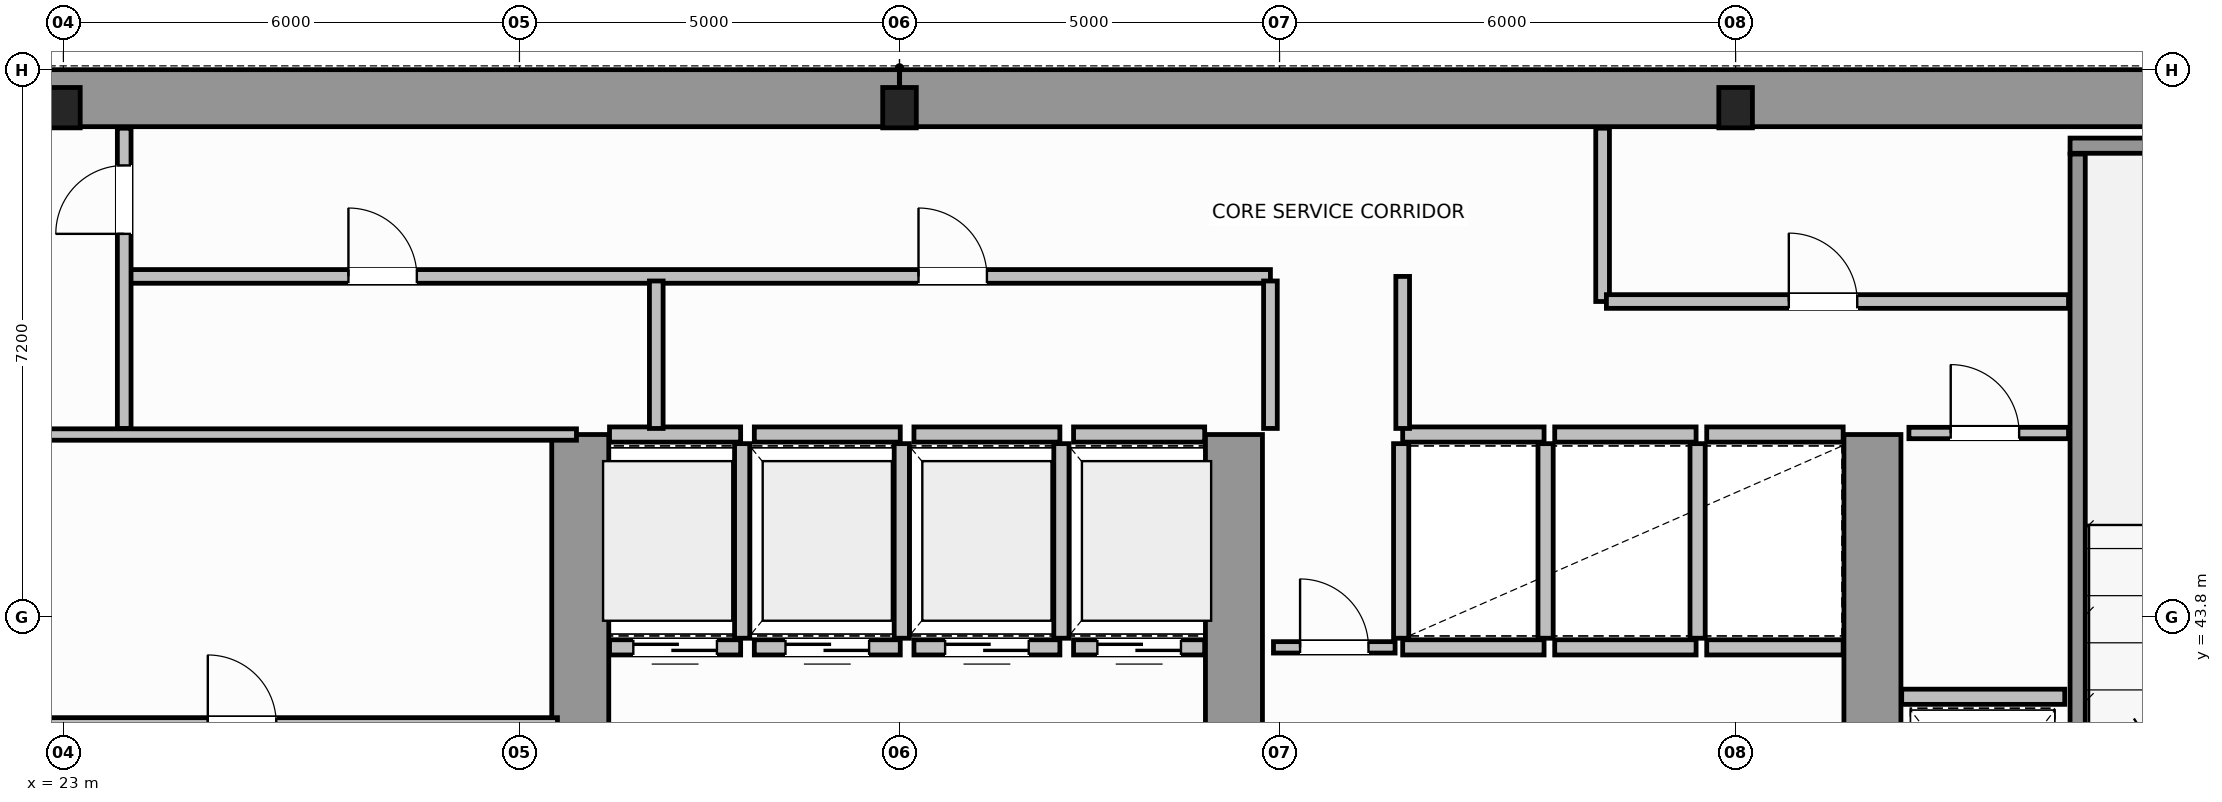
"""IFC4 building model, lengths in metres.
Left out: names, types, materials, properties, quantities, classifications, styles, units other than length and angle.
Written with IfcOpenShell. Run it as: python <this file> out.ifc"""

import sys

from ifc_helpers import new_model, si_unit, direction, frame, frame_2d, origin, origin_2d, place, context, subcontext, project, spatial, rectangle, i_section, extrude, source, transform, mapped, element, fill, save


model = new_model("IFC4")
c1 = context("Model", 3, precision=1e-05, world=origin(), true_north=direction((0.0, 1.0)))
c2 = subcontext(c1, "Body", "Model", "MODEL_VIEW")
j1 = project(units=[si_unit("LENGTHUNIT", "METRE"), si_unit("PLANEANGLEUNIT", "RADIAN")], contexts=[c1])
p1 = place(None, origin())
s1 = spatial("IfcSite", under=j1, at=p1, CompositionType="ELEMENT")
p2 = place(p1, origin())
s2 = spatial("IfcBuilding", under=s1, at=p2, CompositionType="ELEMENT")
p3 = place(p2, frame((0.0, 0.0, 107.2)))
s3 = spatial("IfcBuildingStorey", under=s2, at=p3, CompositionType="ELEMENT", Elevation=107.2)
m1 = source(origin(), c2, "Body", "SweptSolid", [
    extrude(i_section(OverallWidth=0.442, OverallDepth=0.531, WebThickness=0.065, FlangeThickness=0.076, FilletRadius=0.015, at=origin_2d()), origin(), (0.0, 0.0, 1.0), 3.8),
])
for number, where, z_axis, x_axis in (
    (1, (23.0, 50.5, 0.0), (0.0, 0.0, 1.0), (1.0, 0.0, 0.0)),
    (2, (34.0, 50.5, 0.0), (0.0, 0.0, 1.0), (1.0, 0.0, 0.0)),
    (3, (45.0, 50.5, 0.0), (0.0, 0.0, 1.0), (1.0, 0.0, 0.0)),
):
    element("IfcColumn", number, at=place(p3, frame(where, z_axis=z_axis, x_axis=x_axis)), inside=s3, PredefinedType="COLUMN", context=c2, shape_type="MappedRepresentation", body=[
        mapped(m1, transform((0.0, 0.0, 0.0), scale=1.0)),
    ])
for number, where, z_axis, x_axis in (
    (4, (14.379, 50.625, 0.0), (0.0, 0.0, 1.0), (1.0, 0.0, 0.0)),
    (5, (34.002, 50.625, 0.0), (0.0, 0.0, 1.0), (1.0, 0.0, 0.0)),
):
    element("IfcWall", number, at=place(p3, frame(where, z_axis=z_axis, x_axis=x_axis)), inside=s3, PredefinedType="SHEAR", context=c2, shape_type="SweptSolid", body=[
        extrude(rectangle(XDim=19.619, YDim=0.75, at=frame_2d((9.81, 0.0))), origin(), (0.0, 0.0, 1.0), 3.8),
    ])
for number, where, z_axis, x_axis in (
    (6, (29.8, 36.895, 0.0), (0.0, 0.0, 1.0), (0.0, 1.0, 0.0)),
    (7, (38.4, 36.895, 0.0), (0.0, 0.0, 1.0), (0.0, 1.0, 0.0)),
    (8, (46.8, 36.895, 0.0), (0.0, 0.0, 1.0), (0.0, 1.0, 0.0)),
):
    element("IfcWall", number, at=place(p3, frame(where, z_axis=z_axis, x_axis=x_axis)), inside=s3, PredefinedType="SHEAR", context=c2, shape_type="SweptSolid", body=[
        extrude(rectangle(XDim=9.305, YDim=0.75, at=frame_2d((4.652, 0.0))), origin(), (0.0, 0.0, 1.0), 3.8),
    ])
p4 = place(p3, frame((49.4, 50.0, 0.0), z_axis=(0.0, 0.0, 1.0), x_axis=(1.0, 0.0, 0.0)))
e9 = element("IfcWall", 9, at=p4, inside=s3, PredefinedType="SOLIDWALL", context=c2, shape_type="SweptSolid", body=[
    extrude(rectangle(XDim=4.225, YDim=0.2, at=frame_2d((2.113, 0.0))), origin(), (0.0, 0.0, 1.0), 3.8),
])
p5 = place(p3, frame((49.5, 39.96, 0.0), z_axis=(0.0, 0.0, 1.0), x_axis=(0.0, 1.0, 0.0)))
e10 = element("IfcWall", 10, at=p5, inside=s3, PredefinedType="SOLIDWALL", context=c2, shape_type="SweptSolid", body=[
    extrude(rectangle(XDim=9.93, YDim=0.2, at=frame_2d((4.965, 0.0))), origin(), (0.0, 0.0, 1.0), 3.8),
])
p6 = place(p3, frame((30.185, 43.4, 0.0), z_axis=(0.0, 0.0, 1.0), x_axis=(1.0, 0.0, 0.0)))
e11 = element("IfcWall", 11, at=p6, inside=s3, PredefinedType="SOLIDWALL", context=c2, shape_type="SweptSolid", body=[
    extrude(rectangle(XDim=1.725, YDim=0.2, at=frame_2d((0.862, 0.0))), origin(), (0.0, 0.0, 1.0), 3.58),
])
p7 = place(p6, frame((0.313, 0.0, 0.0)))
e12 = element("IfcOpeningElement", 12, at=p7, cuts=e11, PredefinedType="OPENING", context=c2, shape_type="SweptSolid", body=[
    extrude(rectangle(XDim=1.1, YDim=2.15, at=frame_2d((0.55, 1.075))), frame((0.0, 0.11, 0.0), z_axis=(0.0, -1.0, 0.0), x_axis=(1.0, 0.0, 0.0)), (0.0, 0.0, 1.0), 0.22),
])
p8 = place(p3, frame((30.185, 46.2, 0.0), z_axis=(0.0, 0.0, 1.0), x_axis=(1.0, 0.0, 0.0)))
e13 = element("IfcWall", 13, at=p8, inside=s3, PredefinedType="SOLIDWALL", context=c2, shape_type="SweptSolid", body=[
    extrude(rectangle(XDim=1.725, YDim=0.2, at=frame_2d((0.862, 0.0))), origin(), (0.0, 0.0, 1.0), 3.58),
])
p9 = place(p3, frame((31.93, 43.52, 0.0), z_axis=(0.0, 0.0, 1.0), x_axis=(0.0, 1.0, 0.0)))
e14 = element("IfcWall", 14, at=p9, inside=s3, PredefinedType="SOLIDWALL", context=c2, shape_type="SweptSolid", body=[
    extrude(rectangle(XDim=2.56, YDim=0.2, at=frame_2d((1.28, 0.0))), origin(), (0.0, 0.0, 1.0), 3.58),
])
p10 = place(p3, frame((32.09, 43.4, 0.0), z_axis=(0.0, 0.0, 1.0), x_axis=(1.0, 0.0, 0.0)))
e15 = element("IfcWall", 15, at=p10, inside=s3, PredefinedType="SOLIDWALL", context=c2, shape_type="SweptSolid", body=[
    extrude(rectangle(XDim=1.92, YDim=0.2, at=frame_2d((0.96, 0.0))), origin(), (0.0, 0.0, 1.0), 3.58),
])
p11 = place(p10, frame((0.41, 0.0, 0.0)))
e16 = element("IfcOpeningElement", 16, at=p11, cuts=e15, PredefinedType="OPENING", context=c2, shape_type="SweptSolid", body=[
    extrude(rectangle(XDim=1.1, YDim=2.15, at=frame_2d((0.55, 1.075))), frame((0.0, 0.11, 0.0), z_axis=(0.0, -1.0, 0.0), x_axis=(1.0, 0.0, 0.0)), (0.0, 0.0, 1.0), 0.22),
])
p12 = place(p3, frame((32.09, 46.2, 0.0), z_axis=(0.0, 0.0, 1.0), x_axis=(1.0, 0.0, 0.0)))
e17 = element("IfcWall", 17, at=p12, inside=s3, PredefinedType="SOLIDWALL", context=c2, shape_type="SweptSolid", body=[
    extrude(rectangle(XDim=1.92, YDim=0.2, at=frame_2d((0.96, 0.0))), origin(), (0.0, 0.0, 1.0), 3.58),
])
p13 = place(p3, frame((34.03, 43.52, 0.0), z_axis=(0.0, 0.0, 1.0), x_axis=(0.0, 1.0, 0.0)))
e18 = element("IfcWall", 18, at=p13, inside=s3, PredefinedType="SOLIDWALL", context=c2, shape_type="SweptSolid", body=[
    extrude(rectangle(XDim=2.56, YDim=0.2, at=frame_2d((1.28, 0.0))), origin(), (0.0, 0.0, 1.0), 3.58),
])
p14 = place(p3, frame((34.19, 43.4, 0.0), z_axis=(0.0, 0.0, 1.0), x_axis=(1.0, 0.0, 0.0)))
e19 = element("IfcWall", 19, at=p14, inside=s3, PredefinedType="SOLIDWALL", context=c2, shape_type="SweptSolid", body=[
    extrude(rectangle(XDim=1.92, YDim=0.2, at=frame_2d((0.96, 0.0))), origin(), (0.0, 0.0, 1.0), 3.58),
])
p15 = place(p14, frame((0.41, 0.0, 0.0)))
e20 = element("IfcOpeningElement", 20, at=p15, cuts=e19, PredefinedType="OPENING", context=c2, shape_type="SweptSolid", body=[
    extrude(rectangle(XDim=1.1, YDim=2.15, at=frame_2d((0.55, 1.075))), frame((0.0, 0.11, 0.0), z_axis=(0.0, -1.0, 0.0), x_axis=(1.0, 0.0, 0.0)), (0.0, 0.0, 1.0), 0.22),
])
p16 = place(p3, frame((34.19, 46.2, 0.0), z_axis=(0.0, 0.0, 1.0), x_axis=(1.0, 0.0, 0.0)))
e21 = element("IfcWall", 21, at=p16, inside=s3, PredefinedType="SOLIDWALL", context=c2, shape_type="SweptSolid", body=[
    extrude(rectangle(XDim=1.92, YDim=0.2, at=frame_2d((0.96, 0.0))), origin(), (0.0, 0.0, 1.0), 3.58),
])
p17 = place(p3, frame((36.13, 43.52, 0.0), z_axis=(0.0, 0.0, 1.0), x_axis=(0.0, 1.0, 0.0)))
e22 = element("IfcWall", 22, at=p17, inside=s3, PredefinedType="SOLIDWALL", context=c2, shape_type="SweptSolid", body=[
    extrude(rectangle(XDim=2.56, YDim=0.2, at=frame_2d((1.28, 0.0))), origin(), (0.0, 0.0, 1.0), 3.58),
])
p18 = place(p3, frame((36.29, 43.4, 0.0), z_axis=(0.0, 0.0, 1.0), x_axis=(1.0, 0.0, 0.0)))
e23 = element("IfcWall", 23, at=p18, inside=s3, PredefinedType="SOLIDWALL", context=c2, shape_type="SweptSolid", body=[
    extrude(rectangle(XDim=1.725, YDim=0.2, at=frame_2d((0.862, 0.0))), origin(), (0.0, 0.0, 1.0), 3.58),
])
p19 = place(p18, frame((0.313, 0.0, 0.0)))
e24 = element("IfcOpeningElement", 24, at=p19, cuts=e23, PredefinedType="OPENING", context=c2, shape_type="SweptSolid", body=[
    extrude(rectangle(XDim=1.1, YDim=2.15, at=frame_2d((0.55, 1.075))), frame((0.0, 0.11, 0.0), z_axis=(0.0, -1.0, 0.0), x_axis=(1.0, 0.0, 0.0)), (0.0, 0.0, 1.0), 0.22),
])
p20 = place(p3, frame((36.29, 46.2, 0.0), z_axis=(0.0, 0.0, 1.0), x_axis=(1.0, 0.0, 0.0)))
e25 = element("IfcWall", 25, at=p20, inside=s3, PredefinedType="SOLIDWALL", context=c2, shape_type="SweptSolid", body=[
    extrude(rectangle(XDim=1.725, YDim=0.2, at=frame_2d((0.862, 0.0))), origin(), (0.0, 0.0, 1.0), 3.58),
])
for number, where, z_axis, x_axis in (
    (26, (40.62, 43.4, 0.0), (0.0, 0.0, 1.0), (1.0, 0.0, 0.0)),
    (27, (40.62, 46.2, 0.0), (0.0, 0.0, 1.0), (1.0, 0.0, 0.0)),
):
    element("IfcWall", number, at=place(p3, frame(where, z_axis=z_axis, x_axis=x_axis)), inside=s3, PredefinedType="SOLIDWALL", context=c2, shape_type="SweptSolid", body=[
        extrude(rectangle(XDim=1.86, YDim=0.2, at=frame_2d((0.93, 0.0))), origin(), (0.0, 0.0, 1.0), 3.58),
    ])
for number, where, z_axis, x_axis in (
    (28, (40.6, 43.52, 0.0), (0.0, 0.0, 1.0), (0.0, 1.0, 0.0)),
    (29, (42.5, 43.52, 0.0), (0.0, 0.0, 1.0), (0.0, 1.0, 0.0)),
):
    element("IfcWall", number, at=place(p3, frame(where, z_axis=z_axis, x_axis=x_axis)), inside=s3, PredefinedType="SOLIDWALL", context=c2, shape_type="SweptSolid", body=[
        extrude(rectangle(XDim=2.56, YDim=0.2, at=frame_2d((1.28, 0.0))), origin(), (0.0, 0.0, 1.0), 3.58),
    ])
for number, where, z_axis, x_axis in (
    (30, (42.62, 43.4, 0.0), (0.0, 0.0, 1.0), (1.0, 0.0, 0.0)),
    (31, (42.62, 46.2, 0.0), (0.0, 0.0, 1.0), (1.0, 0.0, 0.0)),
):
    element("IfcWall", number, at=place(p3, frame(where, z_axis=z_axis, x_axis=x_axis)), inside=s3, PredefinedType="SOLIDWALL", context=c2, shape_type="SweptSolid", body=[
        extrude(rectangle(XDim=1.86, YDim=0.2, at=frame_2d((0.93, 0.0))), origin(), (0.0, 0.0, 1.0), 3.58),
    ])
p21 = place(p3, frame((44.5, 43.52, 0.0), z_axis=(0.0, 0.0, 1.0), x_axis=(0.0, 1.0, 0.0)))
e32 = element("IfcWall", 32, at=p21, inside=s3, PredefinedType="SOLIDWALL", context=c2, shape_type="SweptSolid", body=[
    extrude(rectangle(XDim=2.56, YDim=0.2, at=frame_2d((1.28, 0.0))), origin(), (0.0, 0.0, 1.0), 3.58),
])
for number, where, z_axis, x_axis in (
    (33, (44.62, 43.4, 0.0), (0.0, 0.0, 1.0), (1.0, 0.0, 0.0)),
    (34, (44.62, 46.2, 0.0), (0.0, 0.0, 1.0), (1.0, 0.0, 0.0)),
):
    element("IfcWall", number, at=place(p3, frame(where, z_axis=z_axis, x_axis=x_axis)), inside=s3, PredefinedType="SOLIDWALL", context=c2, shape_type="SweptSolid", body=[
        extrude(rectangle(XDim=1.795, YDim=0.2, at=frame_2d((0.897, 0.0))), origin(), (0.0, 0.0, 1.0), 3.58),
    ])
p22 = place(p3, frame((47.185, 42.75, 0.0), z_axis=(0.0, 0.0, 1.0), x_axis=(1.0, 0.0, 0.0)))
e35 = element("IfcWall", 35, at=p22, inside=s3, PredefinedType="SOLIDWALL", context=c2, shape_type="SweptSolid", body=[
    extrude(rectangle(XDim=2.145, YDim=0.2, at=frame_2d((1.073, 0.0))), origin(), (0.0, 0.0, 1.0), 3.58),
])
p23 = place(p3, frame((21.25, 46.2, 0.0), z_axis=(0.0, 0.0, 1.0), x_axis=(1.0, 0.0, 0.0)))
e36 = element("IfcWall", 36, at=p23, inside=s3, PredefinedType="PARTITIONING", context=c2, shape_type="SweptSolid", body=[
    extrude(rectangle(XDim=8.5, YDim=0.15, at=frame_2d((4.25, 0.0))), origin(), (0.0, 0.0, 1.0), 3.58),
])
p24 = place(p3, frame((21.5, 42.4, 0.0), z_axis=(0.0, 0.0, 1.0), x_axis=(1.0, 0.0, 0.0)))
e37 = element("IfcWall", 37, at=p24, inside=s3, PredefinedType="PARTITIONING", context=c2, shape_type="SweptSolid", body=[
    extrude(rectangle(XDim=8.0, YDim=0.15, at=frame_2d((4.0, 0.0))), origin(), (0.0, 0.0, 1.0), 3.58),
])
p25 = place(p24, frame((3.4, 0.0, 0.0)))
e38 = element("IfcOpeningElement", 38, at=p25, cuts=e37, PredefinedType="OPENING", context=c2, shape_type="SweptSolid", body=[
    extrude(rectangle(XDim=0.9, YDim=2.1, at=frame_2d((0.45, 1.05))), frame((0.0, 0.085, 0.0), z_axis=(0.0, -1.0, 0.0), x_axis=(1.0, 0.0, 0.0)), (0.0, 0.0, 1.0), 0.17),
])
p26 = place(p3, frame((47.28, 46.22, 0.0), z_axis=(0.0, 0.0, 1.0), x_axis=(1.0, 0.0, 0.0)))
e39 = element("IfcWall", 39, at=p26, inside=s3, PredefinedType="PARTITIONING", context=c2, shape_type="SweptSolid", body=[
    extrude(rectangle(XDim=2.1, YDim=0.15, at=frame_2d((1.05, 0.0))), origin(), (0.0, 0.0, 1.0), 3.58),
])
p27 = place(p26, frame((0.55, 0.0, 0.0)))
e40 = element("IfcOpeningElement", 40, at=p27, cuts=e39, PredefinedType="OPENING", context=c2, shape_type="SweptSolid", body=[
    extrude(rectangle(XDim=0.9, YDim=2.1, at=frame_2d((0.45, 1.05))), frame((0.0, 0.085, 0.0), z_axis=(0.0, -1.0, 0.0), x_axis=(1.0, 0.0, 0.0)), (0.0, 0.0, 1.0), 0.17),
])
p28 = place(p3, frame((38.92, 43.4, 0.0), z_axis=(0.0, 0.0, 1.0), x_axis=(1.0, 0.0, 0.0)))
e41 = element("IfcWall", 41, at=p28, inside=s3, PredefinedType="PARTITIONING", context=c2, shape_type="SweptSolid", body=[
    extrude(rectangle(XDim=1.6, YDim=0.15, at=frame_2d((0.8, 0.0))), origin(), (0.0, 0.0, 1.0), 3.58),
])
p29 = place(p28, frame((0.35, 0.0, 0.0)))
e42 = element("IfcOpeningElement", 42, at=p29, cuts=e41, PredefinedType="OPENING", context=c2, shape_type="SweptSolid", body=[
    extrude(rectangle(XDim=0.9, YDim=2.1, at=frame_2d((0.45, 1.05))), frame((0.0, 0.085, 0.0), z_axis=(0.0, -1.0, 0.0), x_axis=(1.0, 0.0, 0.0)), (0.0, 0.0, 1.0), 0.17),
])
p30 = place(p3, frame((23.85, 48.28, 0.0), z_axis=(0.0, 0.0, 1.0), x_axis=(1.0, 0.0, 0.0)))
e43 = element("IfcWall", 43, at=p30, inside=s3, PredefinedType="PLUMBINGWALL", context=c2, shape_type="SweptSolid", body=[
    extrude(rectangle(XDim=15.03, YDim=0.18, at=frame_2d((7.515, 0.0))), origin(), (0.0, 0.0, 1.0), 3.58),
])
p31 = place(p30, frame((2.9, 0.0, 0.0)))
e44 = element("IfcOpeningElement", 44, at=p31, cuts=e43, PredefinedType="OPENING", context=c2, shape_type="SweptSolid", body=[
    extrude(rectangle(XDim=0.9, YDim=2.15, at=frame_2d((0.45, 1.075))), frame((0.0, 0.1, 0.0), z_axis=(0.0, -1.0, 0.0), x_axis=(1.0, 0.0, 0.0)), (0.0, 0.0, 1.0), 0.2),
])
p32 = place(p30, frame((10.4, 0.0, 0.0)))
e45 = element("IfcOpeningElement", 45, at=p32, cuts=e43, PredefinedType="OPENING", context=c2, shape_type="SweptSolid", body=[
    extrude(rectangle(XDim=0.9, YDim=2.15, at=frame_2d((0.45, 1.075))), frame((0.0, 0.1, 0.0), z_axis=(0.0, -1.0, 0.0), x_axis=(1.0, 0.0, 0.0)), (0.0, 0.0, 1.0), 0.2),
])
p33 = place(p3, frame((23.8, 46.28, 0.0), z_axis=(0.0, 0.0, 1.0), x_axis=(0.0, 1.0, 0.0)))
e46 = element("IfcWall", 46, at=p33, inside=s3, PredefinedType="PLUMBINGWALL", context=c2, shape_type="SweptSolid", body=[
    extrude(rectangle(XDim=3.95, YDim=0.18, at=frame_2d((1.975, 0.0))), origin(), (0.0, 0.0, 1.0), 3.58),
])
p34 = place(p33, frame((2.56, 0.0, 0.0)))
e47 = element("IfcOpeningElement", 47, at=p34, cuts=e46, PredefinedType="OPENING", context=c2, shape_type="SweptSolid", body=[
    extrude(rectangle(XDim=0.9, YDim=2.15, at=frame_2d((0.45, 1.075))), frame((0.0, 0.1, 0.0), z_axis=(0.0, -1.0, 0.0), x_axis=(1.0, 0.0, 0.0)), (0.0, 0.0, 1.0), 0.2),
])
for number, where, z_axis, x_axis in (
    (48, (30.8, 46.28, 0.0), (0.0, 0.0, 1.0), (0.0, 1.0, 0.0)),
    (49, (38.88, 46.28, 0.0), (0.0, 0.0, 1.0), (0.0, 1.0, 0.0)),
):
    element("IfcWall", number, at=place(p3, frame(where, z_axis=z_axis, x_axis=x_axis)), inside=s3, PredefinedType="PLUMBINGWALL", context=c2, shape_type="SweptSolid", body=[
        extrude(rectangle(XDim=1.94, YDim=0.18, at=frame_2d((0.97, 0.0))), origin(), (0.0, 0.0, 1.0), 3.58),
    ])
p35 = place(p3, frame((40.62, 46.28, 0.0), z_axis=(0.0, 0.0, 1.0), x_axis=(0.0, 1.0, 0.0)))
e50 = element("IfcWall", 50, at=p35, inside=s3, PredefinedType="PLUMBINGWALL", context=c2, shape_type="SweptSolid", body=[
    extrude(rectangle(XDim=2.0, YDim=0.18, at=frame_2d((1.0, 0.0))), origin(), (0.0, 0.0, 1.0), 3.58),
])
p36 = place(p3, frame((43.25, 47.95, 0.0), z_axis=(0.0, 0.0, 1.0), x_axis=(0.0, 1.0, 0.0)))
e51 = element("IfcWall", 51, at=p36, inside=s3, PredefinedType="PLUMBINGWALL", context=c2, shape_type="SweptSolid", body=[
    extrude(rectangle(XDim=2.28, YDim=0.18, at=frame_2d((1.14, 0.0))), origin(), (0.0, 0.0, 1.0), 3.58),
])
p37 = place(p3, frame((43.3, 47.95, 0.0), z_axis=(0.0, 0.0, 1.0), x_axis=(1.0, 0.0, 0.0)))
e52 = element("IfcWall", 52, at=p37, inside=s3, PredefinedType="PLUMBINGWALL", context=c2, shape_type="SweptSolid", body=[
    extrude(rectangle(XDim=6.08, YDim=0.18, at=frame_2d((3.04, 0.0))), origin(), (0.0, 0.0, 1.0), 3.58),
])
p38 = place(p37, frame((2.4, 0.0, 0.0)))
e53 = element("IfcOpeningElement", 53, at=p38, cuts=e52, PredefinedType="OPENING", context=c2, shape_type="SweptSolid", body=[
    extrude(rectangle(XDim=0.9, YDim=2.15, at=frame_2d((0.45, 1.075))), frame((0.0, 0.1, 0.0), z_axis=(0.0, -1.0, 0.0), x_axis=(1.0, 0.0, 0.0)), (0.0, 0.0, 1.0), 0.2),
])
m2 = source(origin(), c2, "Body", "SweptSolid", [
    extrude(rectangle(XDim=1.1, YDim=2.15, at=frame_2d((0.55, 1.075))), frame((0.0, 0.025, 0.0), z_axis=(0.0, -1.0, 0.0), x_axis=(1.0, 0.0, 0.0)), (0.0, 0.0, 1.0), 0.05),
])
p39 = place(p7, origin())
e54 = element("IfcDoor", 54, at=p39, inside=s3, OperationType="DOUBLE_DOOR_SLIDING", PredefinedType="DOOR", context=c2, shape_type="MappedRepresentation", body=[
    mapped(m2, transform((0.0, 0.0, 0.0), scale=1.0)),
])
fill(e12, e54)
p40 = place(p11, origin())
e55 = element("IfcDoor", 55, at=p40, inside=s3, OperationType="DOUBLE_DOOR_SLIDING", PredefinedType="DOOR", context=c2, shape_type="MappedRepresentation", body=[
    mapped(m2, transform((0.0, 0.0, 0.0), scale=1.0)),
])
fill(e16, e55)
p41 = place(p15, origin())
e56 = element("IfcDoor", 56, at=p41, inside=s3, OperationType="DOUBLE_DOOR_SLIDING", PredefinedType="DOOR", context=c2, shape_type="MappedRepresentation", body=[
    mapped(m2, transform((0.0, 0.0, 0.0), scale=1.0)),
])
fill(e20, e56)
p42 = place(p19, origin())
e57 = element("IfcDoor", 57, at=p42, inside=s3, OperationType="DOUBLE_DOOR_SLIDING", PredefinedType="DOOR", context=c2, shape_type="MappedRepresentation", body=[
    mapped(m2, transform((0.0, 0.0, 0.0), scale=1.0)),
])
fill(e24, e57)
m3 = source(origin(), c2, "Body", "SweptSolid", [
    extrude(rectangle(XDim=0.9, YDim=2.1, at=frame_2d((0.45, 1.05))), frame((0.0, 0.025, 0.0), z_axis=(0.0, -1.0, 0.0), x_axis=(1.0, 0.0, 0.0)), (0.0, 0.0, 1.0), 0.05),
])
p43 = place(p25, origin())
e58 = element("IfcDoor", 58, at=p43, inside=s3, OperationType="SINGLE_SWING_RIGHT", PredefinedType="DOOR", context=c2, shape_type="MappedRepresentation", body=[
    mapped(m3, transform((0.0, 0.0, 0.0), scale=1.0)),
])
fill(e38, e58)
p44 = place(p27, origin())
e59 = element("IfcDoor", 59, at=p44, inside=s3, OperationType="SINGLE_SWING_RIGHT", PredefinedType="DOOR", context=c2, shape_type="MappedRepresentation", body=[
    mapped(m3, transform((0.0, 0.0, 0.0), scale=1.0)),
])
fill(e40, e59)
p45 = place(p29, origin())
e60 = element("IfcDoor", 60, at=p45, inside=s3, OperationType="SINGLE_SWING_LEFT", PredefinedType="DOOR", context=c2, shape_type="MappedRepresentation", body=[
    mapped(m3, transform((0.0, 0.0, 0.0), scale=1.0)),
])
fill(e42, e60)
m4 = source(origin(), c2, "Body", "SweptSolid", [
    extrude(rectangle(XDim=0.9, YDim=2.15, at=frame_2d((0.45, 1.075))), frame((0.0, 0.025, 0.0), z_axis=(0.0, -1.0, 0.0), x_axis=(1.0, 0.0, 0.0)), (0.0, 0.0, 1.0), 0.05),
])
p46 = place(p34, origin())
e61 = element("IfcDoor", 61, at=p46, inside=s3, OperationType="SINGLE_SWING_LEFT", PredefinedType="DOOR", context=c2, shape_type="MappedRepresentation", body=[
    mapped(m4, transform((0.0, 0.0, 0.0), scale=1.0)),
])
fill(e47, e61)
p47 = place(p31, origin())
e62 = element("IfcDoor", 62, at=p47, inside=s3, OperationType="SINGLE_SWING_RIGHT", PredefinedType="DOOR", context=c2, shape_type="MappedRepresentation", body=[
    mapped(m4, transform((0.0, 0.0, 0.0), scale=1.0)),
])
fill(e44, e62)
p48 = place(p32, origin())
e63 = element("IfcDoor", 63, at=p48, inside=s3, OperationType="SINGLE_SWING_LEFT", PredefinedType="DOOR", context=c2, shape_type="MappedRepresentation", body=[
    mapped(m4, transform((0.0, 0.0, 0.0), scale=1.0)),
])
fill(e45, e63)
p49 = place(p38, origin())
e64 = element("IfcDoor", 64, at=p49, inside=s3, OperationType="SINGLE_SWING_RIGHT", PredefinedType="DOOR", context=c2, shape_type="MappedRepresentation", body=[
    mapped(m4, transform((0.0, 0.0, 0.0), scale=1.0)),
])
fill(e53, e64)
save(model, sys.argv[1])
